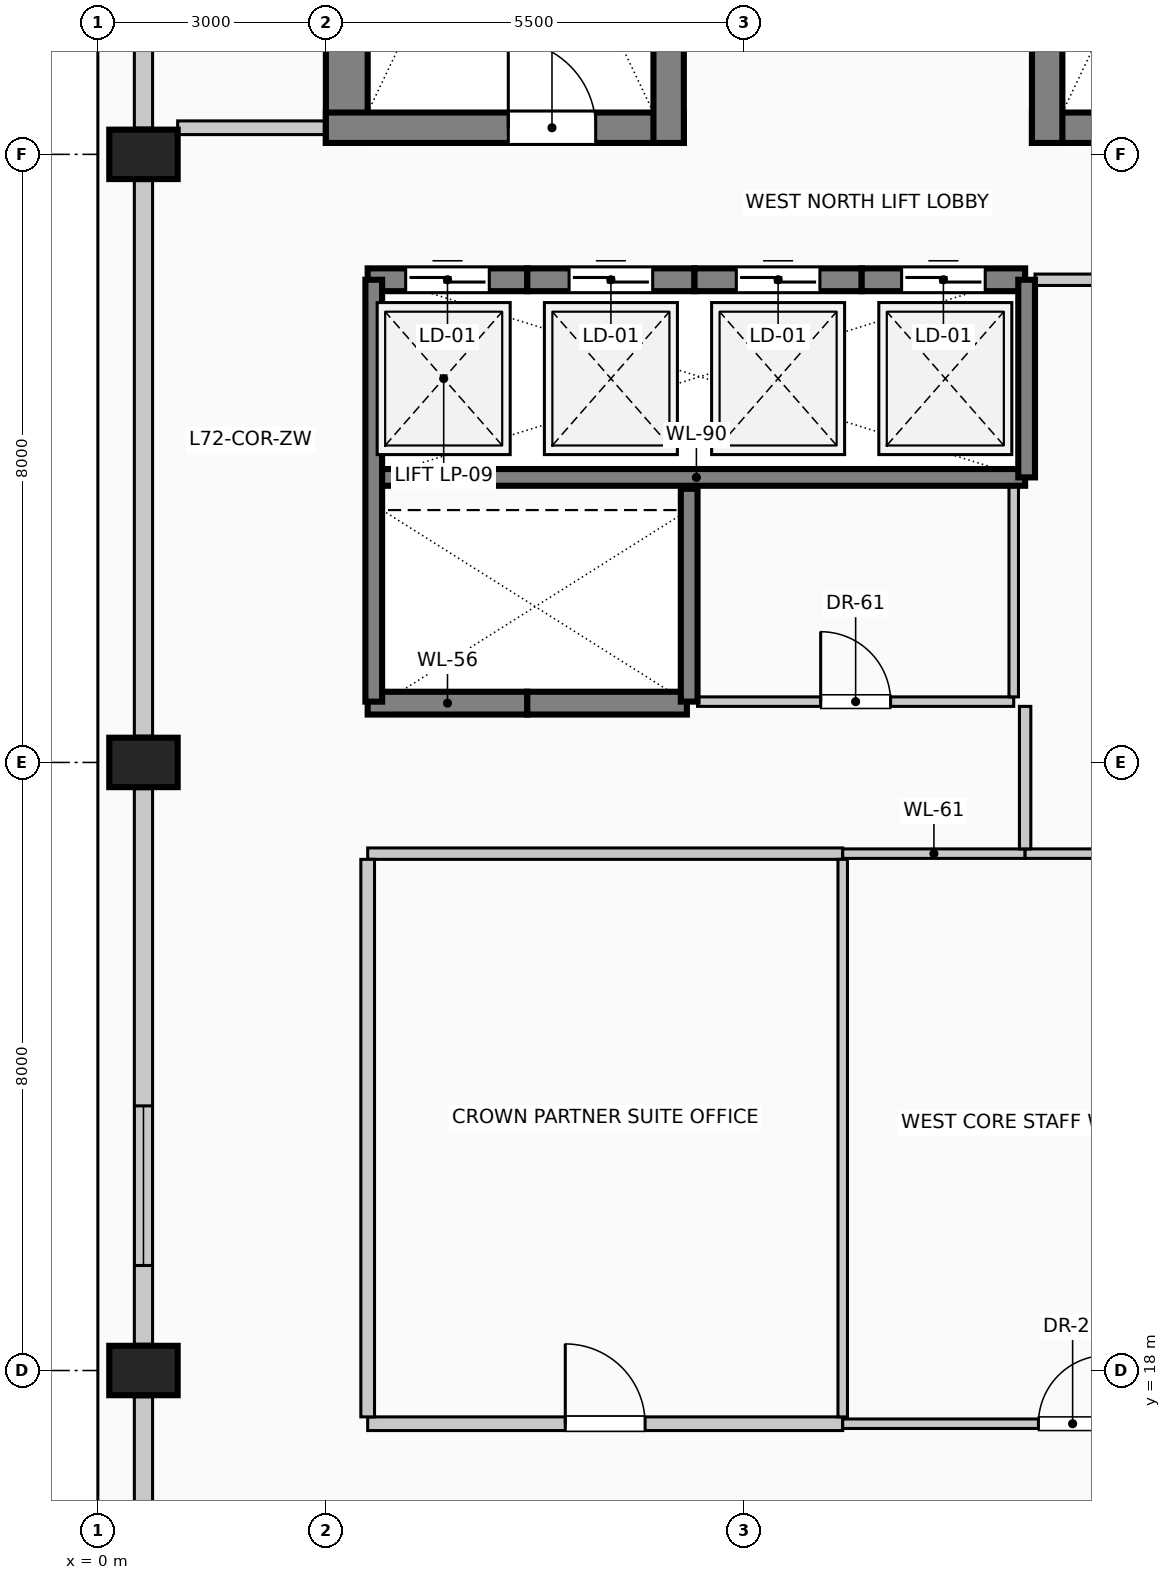
"""IFC4 building model, lengths in metres.
Left out: names, types, materials, properties, quantities, classifications, styles, units other than length and angle.
Written with IfcOpenShell. Run it as: python <this file> out.ifc"""

import sys

from ifc_helpers import new_model, si_unit, direction, frame, frame_2d, origin, origin_2d, place, context, subcontext, project, spatial, rectangle, extrude, element, fill, save


model = new_model("IFC4")
c1 = context("Model", 3, precision=1e-05, world=origin(), true_north=direction((0.0, 1.0)))
c2 = subcontext(c1, "Body", "Model", "MODEL_VIEW")
j1 = project(units=[si_unit("LENGTHUNIT", "METRE"), si_unit("PLANEANGLEUNIT", "RADIAN")], contexts=[c1])
p1 = place(None, origin())
s1 = spatial("IfcSite", under=j1, at=p1, CompositionType="ELEMENT")
p2 = place(p1, origin())
s2 = spatial("IfcBuilding", under=s1, at=p2, CompositionType="ELEMENT")
p3 = place(p2, frame((0.0, 0.0, 297.0)))
s3 = spatial("IfcBuildingStorey", under=s2, at=p3, CompositionType="ELEMENT", Elevation=297.0)
p4 = place(p3, frame((3.275, 34.15, 0.0), z_axis=(0.0, 0.0, 1.0), x_axis=(0.0, 1.0, 0.0)))
e1 = element("IfcWall", 1, at=p4, inside=s3, PredefinedType="SHEAR", context=c2, shape_type="SweptSolid", body=[
    extrude(rectangle(XDim=8.83, YDim=0.55, at=frame_2d((4.415, 0.0))), origin(), (0.0, 0.0, 1.0), 4.0),
])
p5 = place(p3, frame((3.0, 34.35, 0.0), z_axis=(0.0, 0.0, 1.0), x_axis=(1.0, 0.0, 0.0)))
e2 = element("IfcWall", 2, at=p5, inside=s3, PredefinedType="SHEAR", context=c2, shape_type="SweptSolid", body=[
    extrude(rectangle(XDim=4.71, YDim=0.4, at=frame_2d((2.355, 0.0))), origin(), (0.0, 0.0, 1.0), 4.0),
])
p6 = place(p5, frame((2.4, 0.0, 0.0)))
e3 = element("IfcOpeningElement", 3, at=p6, cuts=e2, PredefinedType="OPENING", context=c2, shape_type="SweptSolid", body=[
    extrude(rectangle(XDim=1.15, YDim=2.2, at=frame_2d((0.575, 1.1))), frame((0.0, 0.21, 0.0), z_axis=(0.0, -1.0, 0.0), x_axis=(1.0, 0.0, 0.0)), (0.0, 0.0, 1.0), 0.42),
])
p7 = place(p3, frame((12.29, 34.35, 0.0), z_axis=(0.0, 0.0, 1.0), x_axis=(1.0, 0.0, 0.0)))
e4 = element("IfcWall", 4, at=p7, inside=s3, PredefinedType="SHEAR", context=c2, shape_type="SweptSolid", body=[
    extrude(rectangle(XDim=4.71, YDim=0.4, at=frame_2d((2.355, 0.0))), origin(), (0.0, 0.0, 1.0), 4.0),
])
p8 = place(p7, frame((1.4, 0.0, 0.0)))
e5 = element("IfcOpeningElement", 5, at=p8, cuts=e4, PredefinedType="OPENING", context=c2, shape_type="SweptSolid", body=[
    extrude(rectangle(XDim=1.15, YDim=2.2, at=frame_2d((0.575, 1.1))), frame((0.0, 0.21, 0.0), z_axis=(0.0, -1.0, 0.0), x_axis=(1.0, 0.0, 0.0)), (0.0, 0.0, 1.0), 0.42),
])
for number, where, z_axis, x_axis in (
    (6, (7.51, 34.15, 0.0), (0.0, 0.0, 1.0), (0.0, 1.0, 0.0)),
    (7, (12.49, 34.15, 0.0), (0.0, 0.0, 1.0), (0.0, 1.0, 0.0)),
):
    element("IfcWall", number, at=place(p3, frame(where, z_axis=z_axis, x_axis=x_axis)), inside=s3, PredefinedType="SHEAR", context=c2, shape_type="SweptSolid", body=[
        extrude(rectangle(XDim=8.83, YDim=0.4, at=frame_2d((4.415, 0.0))), origin(), (0.0, 0.0, 1.0), 4.0),
    ])
for number, where, z_axis, x_axis in (
    (8, (0.6, 18.0, 0.0), (0.0, 0.0, 1.0), (0.0, 1.0, 0.0)),
    (9, (0.6, 26.0, 0.0), (0.0, 0.0, 1.0), (0.0, 1.0, 0.0)),
    (10, (0.6, 34.0, 0.0), (0.0, 0.0, 1.0), (0.0, 1.0, 0.0)),
):
    element("IfcColumn", number, at=place(p3, frame(where, z_axis=z_axis, x_axis=x_axis)), inside=s3, PredefinedType="COLUMN", context=c2, shape_type="SweptSolid", body=[
        extrude(rectangle(XDim=0.65, YDim=0.9, at=origin_2d()), origin(), (0.0, 0.0, 1.0), 4.0),
    ])
p9 = place(p3, frame((0.6, 10.345, 0.0), z_axis=(0.0, 0.0, 1.0), x_axis=(0.0, 1.0, 0.0)))
e11 = element("IfcWall", 11, at=p9, inside=s3, PredefinedType="SOLIDWALL", context=c2, shape_type="SweptSolid", body=[
    extrude(rectangle(XDim=7.31, YDim=0.24, at=frame_2d((3.655, 0.0))), origin(), (0.0, 0.0, 1.0), 3.025),
])
p10 = place(p9, frame((1.037, 0.0, 0.35)))
e12 = element("IfcOpeningElement", 12, at=p10, cuts=e11, PredefinedType="OPENING", context=c2, shape_type="SweptSolid", body=[
    extrude(rectangle(XDim=2.1, YDim=2.2, at=frame_2d((1.05, 1.1))), frame((0.0, 0.13, 0.0), z_axis=(0.0, -1.0, 0.0), x_axis=(1.0, 0.0, 0.0)), (0.0, 0.0, 1.0), 0.26),
])
p11 = place(p3, frame((0.6, 18.345, 0.0), z_axis=(0.0, 0.0, 1.0), x_axis=(0.0, 1.0, 0.0)))
e13 = element("IfcWall", 13, at=p11, inside=s3, PredefinedType="SOLIDWALL", context=c2, shape_type="SweptSolid", body=[
    extrude(rectangle(XDim=7.31, YDim=0.24, at=frame_2d((3.655, 0.0))), origin(), (0.0, 0.0, 1.0), 3.025),
])
p12 = place(p11, frame((1.037, 0.0, 0.35)))
e14 = element("IfcOpeningElement", 14, at=p12, cuts=e13, PredefinedType="OPENING", context=c2, shape_type="SweptSolid", body=[
    extrude(rectangle(XDim=2.1, YDim=2.2, at=frame_2d((1.05, 1.1))), frame((0.0, 0.13, 0.0), z_axis=(0.0, -1.0, 0.0), x_axis=(1.0, 0.0, 0.0)), (0.0, 0.0, 1.0), 0.26),
])
p13 = place(p3, frame((0.6, 26.345, 0.0), z_axis=(0.0, 0.0, 1.0), x_axis=(0.0, 1.0, 0.0)))
e15 = element("IfcWall", 15, at=p13, inside=s3, PredefinedType="SOLIDWALL", context=c2, shape_type="SweptSolid", body=[
    extrude(rectangle(XDim=7.31, YDim=0.24, at=frame_2d((3.655, 0.0))), origin(), (0.0, 0.0, 1.0), 3.025),
])
p14 = place(p3, frame((0.6, 34.345, 0.0), z_axis=(0.0, 0.0, 1.0), x_axis=(0.0, 1.0, 0.0)))
e16 = element("IfcWall", 16, at=p14, inside=s3, PredefinedType="SOLIDWALL", context=c2, shape_type="SweptSolid", body=[
    extrude(rectangle(XDim=7.71, YDim=0.24, at=frame_2d((3.855, 0.0))), origin(), (0.0, 0.0, 1.0), 3.025),
])
p15 = place(p3, frame((3.55, 32.35, 0.0), z_axis=(0.0, 0.0, 1.0), x_axis=(1.0, 0.0, 0.0)))
e17 = element("IfcWall", 17, at=p15, inside=s3, PredefinedType="SOLIDWALL", context=c2, shape_type="SweptSolid", body=[
    extrude(rectangle(XDim=2.1, YDim=0.3, at=frame_2d((1.05, 0.0))), origin(), (0.0, 0.0, 1.0), 4.0),
])
p16 = place(p15, frame((0.5, 0.0, 0.0)))
e18 = element("IfcOpeningElement", 18, at=p16, cuts=e17, PredefinedType="OPENING", context=c2, shape_type="SweptSolid", body=[
    extrude(rectangle(XDim=1.1, YDim=2.2, at=frame_2d((0.55, 1.1))), frame((0.0, 0.16, 0.0), z_axis=(0.0, -1.0, 0.0), x_axis=(1.0, 0.0, 0.0)), (0.0, 0.0, 1.0), 0.32),
])
p17 = place(p3, frame((5.65, 32.35, 0.0), z_axis=(0.0, 0.0, 1.0), x_axis=(1.0, 0.0, 0.0)))
e19 = element("IfcWall", 19, at=p17, inside=s3, PredefinedType="SOLIDWALL", context=c2, shape_type="SweptSolid", body=[
    extrude(rectangle(XDim=2.2, YDim=0.3, at=frame_2d((1.1, 0.0))), origin(), (0.0, 0.0, 1.0), 4.0),
])
p18 = place(p17, frame((0.55, 0.0, 0.0)))
e20 = element("IfcOpeningElement", 20, at=p18, cuts=e19, PredefinedType="OPENING", context=c2, shape_type="SweptSolid", body=[
    extrude(rectangle(XDim=1.1, YDim=2.2, at=frame_2d((0.55, 1.1))), frame((0.0, 0.16, 0.0), z_axis=(0.0, -1.0, 0.0), x_axis=(1.0, 0.0, 0.0)), (0.0, 0.0, 1.0), 0.32),
])
p19 = place(p3, frame((7.85, 32.35, 0.0), z_axis=(0.0, 0.0, 1.0), x_axis=(1.0, 0.0, 0.0)))
e21 = element("IfcWall", 21, at=p19, inside=s3, PredefinedType="SOLIDWALL", context=c2, shape_type="SweptSolid", body=[
    extrude(rectangle(XDim=2.2, YDim=0.3, at=frame_2d((1.1, 0.0))), origin(), (0.0, 0.0, 1.0), 4.0),
])
p20 = place(p19, frame((0.55, 0.0, 0.0)))
e22 = element("IfcOpeningElement", 22, at=p20, cuts=e21, PredefinedType="OPENING", context=c2, shape_type="SweptSolid", body=[
    extrude(rectangle(XDim=1.1, YDim=2.2, at=frame_2d((0.55, 1.1))), frame((0.0, 0.16, 0.0), z_axis=(0.0, -1.0, 0.0), x_axis=(1.0, 0.0, 0.0)), (0.0, 0.0, 1.0), 0.32),
])
p21 = place(p3, frame((10.05, 32.35, 0.0), z_axis=(0.0, 0.0, 1.0), x_axis=(1.0, 0.0, 0.0)))
e23 = element("IfcWall", 23, at=p21, inside=s3, PredefinedType="SOLIDWALL", context=c2, shape_type="SweptSolid", body=[
    extrude(rectangle(XDim=2.15, YDim=0.3, at=frame_2d((1.075, 0.0))), origin(), (0.0, 0.0, 1.0), 4.0),
])
p22 = place(p21, frame((0.525, 0.0, 0.0)))
e24 = element("IfcOpeningElement", 24, at=p22, cuts=e23, PredefinedType="OPENING", context=c2, shape_type="SweptSolid", body=[
    extrude(rectangle(XDim=1.1, YDim=2.2, at=frame_2d((0.55, 1.1))), frame((0.0, 0.16, 0.0), z_axis=(0.0, -1.0, 0.0), x_axis=(1.0, 0.0, 0.0)), (0.0, 0.0, 1.0), 0.32),
])
p23 = place(p3, frame((5.65, 26.78, 0.0), z_axis=(0.0, 0.0, 1.0), x_axis=(-1.0, 0.0, 0.0)))
e25 = element("IfcWall", 25, at=p23, inside=s3, PredefinedType="SOLIDWALL", context=c2, shape_type="SweptSolid", body=[
    extrude(rectangle(XDim=2.1, YDim=0.3, at=frame_2d((1.05, 0.0))), origin(), (0.0, 0.0, 1.0), 4.0),
])
p24 = place(p3, frame((7.75, 26.78, 0.0), z_axis=(0.0, 0.0, 1.0), x_axis=(-1.0, 0.0, 0.0)))
e26 = element("IfcWall", 26, at=p24, inside=s3, PredefinedType="SOLIDWALL", context=c2, shape_type="SweptSolid", body=[
    extrude(rectangle(XDim=2.1, YDim=0.3, at=frame_2d((1.05, 0.0))), origin(), (0.0, 0.0, 1.0), 4.0),
])
p25 = place(p3, frame((3.55, 29.75, 0.0), z_axis=(0.0, 0.0, 1.0), x_axis=(1.0, 0.0, 0.0)))
e27 = element("IfcWall", 27, at=p25, inside=s3, PredefinedType="SOLIDWALL", context=c2, shape_type="SweptSolid", body=[
    extrude(rectangle(XDim=8.65, YDim=0.22, at=frame_2d((4.325, 0.0))), origin(), (0.0, 0.0, 1.0), 4.0),
])
p26 = place(p3, frame((3.63, 26.8, 0.0), z_axis=(0.0, 0.0, 1.0), x_axis=(0.0, 1.0, 0.0)))
e28 = element("IfcWall", 28, at=p26, inside=s3, PredefinedType="SOLIDWALL", context=c2, shape_type="SweptSolid", body=[
    extrude(rectangle(XDim=5.55, YDim=0.22, at=frame_2d((2.775, 0.0))), origin(), (0.0, 0.0, 1.0), 4.0),
])
p27 = place(p3, frame((7.78, 26.8, 0.0), z_axis=(0.0, 0.0, 1.0), x_axis=(0.0, 1.0, 0.0)))
e29 = element("IfcWall", 29, at=p27, inside=s3, PredefinedType="SOLIDWALL", context=c2, shape_type="SweptSolid", body=[
    extrude(rectangle(XDim=2.8, YDim=0.22, at=frame_2d((1.4, 0.0))), origin(), (0.0, 0.0, 1.0), 4.0),
])
p28 = place(p3, frame((12.22, 29.75, 0.0), z_axis=(0.0, 0.0, 1.0), x_axis=(0.0, 1.0, 0.0)))
e30 = element("IfcWall", 30, at=p28, inside=s3, PredefinedType="SOLIDWALL", context=c2, shape_type="SweptSolid", body=[
    extrude(rectangle(XDim=2.6, YDim=0.22, at=frame_2d((1.3, 0.0))), origin(), (0.0, 0.0, 1.0), 4.0),
])
p29 = place(p3, frame((3.55, 17.3, 0.0), z_axis=(0.0, 0.0, 1.0), x_axis=(1.0, 0.0, 0.0)))
e31 = element("IfcWall", 31, at=p29, inside=s3, PredefinedType="PARTITIONING", context=c2, shape_type="SweptSolid", body=[
    extrude(rectangle(XDim=6.25, YDim=0.18, at=frame_2d((3.125, 0.0))), origin(), (0.0, 0.0, 1.0), 3.775),
])
p30 = place(p29, frame((2.6, 0.0, 0.0)))
e32 = element("IfcOpeningElement", 32, at=p30, cuts=e31, PredefinedType="OPENING", context=c2, shape_type="SweptSolid", body=[
    extrude(rectangle(XDim=1.05, YDim=2.15, at=frame_2d((0.525, 1.075))), frame((0.0, 0.1, 0.0), z_axis=(0.0, -1.0, 0.0), x_axis=(1.0, 0.0, 0.0)), (0.0, 0.0, 1.0), 0.2),
])
p31 = place(p3, frame((9.8, 17.3, 0.0), z_axis=(0.0, 0.0, 1.0), x_axis=(1.0, 0.0, 0.0)))
e33 = element("IfcWall", 33, at=p31, inside=s3, PredefinedType="PARTITIONING", context=c2, shape_type="SweptSolid", body=[
    extrude(rectangle(XDim=6.05, YDim=0.125, at=frame_2d((3.025, 0.0))), origin(), (0.0, 0.0, 1.0), 3.775),
])
p32 = place(p31, frame((2.575, 0.0, 0.0)))
e34 = element("IfcOpeningElement", 34, at=p32, cuts=e33, PredefinedType="OPENING", context=c2, shape_type="SweptSolid", body=[
    extrude(rectangle(XDim=0.9, YDim=2.1, at=frame_2d((0.45, 1.05))), frame((0.0, 0.073, 0.0), z_axis=(0.0, -1.0, 0.0), x_axis=(1.0, 0.0, 0.0)), (0.0, 0.0, 1.0), 0.145),
])
p33 = place(p3, frame((3.55, 24.8, 0.0), z_axis=(0.0, 0.0, 1.0), x_axis=(1.0, 0.0, 0.0)))
e35 = element("IfcWall", 35, at=p33, inside=s3, PredefinedType="PARTITIONING", context=c2, shape_type="SweptSolid", body=[
    extrude(rectangle(XDim=6.25, YDim=0.15, at=frame_2d((3.125, 0.0))), origin(), (0.0, 0.0, 1.0), 3.775),
])
p34 = place(p3, frame((9.8, 24.8, 0.0), z_axis=(0.0, 0.0, 1.0), x_axis=(1.0, 0.0, 0.0)))
e36 = element("IfcWall", 36, at=p34, inside=s3, PredefinedType="PARTITIONING", context=c2, shape_type="SweptSolid", body=[
    extrude(rectangle(XDim=2.4, YDim=0.125, at=frame_2d((1.2, 0.0))), origin(), (0.0, 0.0, 1.0), 3.775),
])
p35 = place(p3, frame((12.2, 24.8, 0.0), z_axis=(0.0, 0.0, 1.0), x_axis=(1.0, 0.0, 0.0)))
e37 = element("IfcWall", 37, at=p35, inside=s3, PredefinedType="PARTITIONING", context=c2, shape_type="SweptSolid", body=[
    extrude(rectangle(XDim=3.65, YDim=0.125, at=frame_2d((1.825, 0.0))), origin(), (0.0, 0.0, 1.0), 3.775),
])
p36 = place(p3, frame((7.89, 26.8, 0.0), z_axis=(0.0, 0.0, 1.0), x_axis=(1.0, 0.0, 0.0)))
e38 = element("IfcWall", 38, at=p36, inside=s3, PredefinedType="PARTITIONING", context=c2, shape_type="SweptSolid", body=[
    extrude(rectangle(XDim=4.16, YDim=0.125, at=frame_2d((2.08, 0.0))), origin(), (0.0, 0.0, 1.0), 3.775),
])
p37 = place(p36, frame((1.62, 0.0, 0.0)))
e39 = element("IfcOpeningElement", 39, at=p37, cuts=e38, PredefinedType="OPENING", context=c2, shape_type="SweptSolid", body=[
    extrude(rectangle(XDim=0.92, YDim=2.1, at=frame_2d((0.46, 1.05))), frame((0.0, 0.073, 0.0), z_axis=(0.0, -1.0, 0.0), x_axis=(1.0, 0.0, 0.0)), (0.0, 0.0, 1.0), 0.145),
])
p38 = place(p3, frame((12.33, 32.35, 0.0), z_axis=(0.0, 0.0, 1.0), x_axis=(1.0, 0.0, 0.0)))
e40 = element("IfcWall", 40, at=p38, inside=s3, PredefinedType="PARTITIONING", context=c2, shape_type="SweptSolid", body=[
    extrude(rectangle(XDim=3.52, YDim=0.15, at=frame_2d((1.76, 0.0))), origin(), (0.0, 0.0, 1.0), 3.775),
])
p39 = place(p38, frame((1.235, 0.0, 0.0)))
e41 = element("IfcOpeningElement", 41, at=p39, cuts=e40, PredefinedType="OPENING", context=c2, shape_type="SweptSolid", body=[
    extrude(rectangle(XDim=1.05, YDim=2.15, at=frame_2d((0.525, 1.075))), frame((0.0, 0.085, 0.0), z_axis=(0.0, -1.0, 0.0), x_axis=(1.0, 0.0, 0.0)), (0.0, 0.0, 1.0), 0.17),
])
p40 = place(p3, frame((1.05, 34.35, 0.0), z_axis=(0.0, 0.0, 1.0), x_axis=(1.0, 0.0, 0.0)))
e42 = element("IfcWall", 42, at=p40, inside=s3, PredefinedType="PARTITIONING", context=c2, shape_type="SweptSolid", body=[
    extrude(rectangle(XDim=1.95, YDim=0.18, at=frame_2d((0.975, 0.0))), origin(), (0.0, 0.0, 1.0), 3.775),
])
p41 = place(p3, frame((3.55, 17.39, 0.0), z_axis=(0.0, 0.0, 1.0), x_axis=(0.0, 1.0, 0.0)))
e43 = element("IfcWall", 43, at=p41, inside=s3, PredefinedType="PARTITIONING", context=c2, shape_type="SweptSolid", body=[
    extrude(rectangle(XDim=7.335, YDim=0.18, at=frame_2d((3.667, 0.0))), origin(), (0.0, 0.0, 1.0), 3.775),
])
p42 = place(p3, frame((9.8, 17.39, 0.0), z_axis=(0.0, 0.0, 1.0), x_axis=(0.0, 1.0, 0.0)))
e44 = element("IfcWall", 44, at=p42, inside=s3, PredefinedType="PARTITIONING", context=c2, shape_type="SweptSolid", body=[
    extrude(rectangle(XDim=7.335, YDim=0.125, at=frame_2d((3.667, 0.0))), origin(), (0.0, 0.0, 1.0), 3.775),
])
p43 = place(p3, frame((12.05, 26.863, 0.0), z_axis=(0.0, 0.0, 1.0), x_axis=(0.0, 1.0, 0.0)))
e45 = element("IfcWall", 45, at=p43, inside=s3, PredefinedType="PARTITIONING", context=c2, shape_type="SweptSolid", body=[
    extrude(rectangle(XDim=2.777, YDim=0.125, at=frame_2d((1.389, 0.0))), origin(), (0.0, 0.0, 1.0), 3.775),
])
p44 = place(p3, frame((12.2, 24.863, 0.0), z_axis=(0.0, 0.0, 1.0), x_axis=(0.0, 1.0, 0.0)))
e46 = element("IfcWall", 46, at=p44, inside=s3, PredefinedType="PARTITIONING", context=c2, shape_type="SweptSolid", body=[
    extrude(rectangle(XDim=1.875, YDim=0.15, at=frame_2d((0.938, 0.0))), origin(), (0.0, 0.0, 1.0), 3.775),
])
p45 = place(p12, origin())
e47 = element("IfcWindow", 47, at=p45, inside=s3, PartitioningType="SINGLE_PANEL", PredefinedType="WINDOW", context=c2, shape_type="SweptSolid", body=[
    extrude(rectangle(XDim=2.1, YDim=2.2, at=frame_2d((1.05, 1.1))), frame((0.0, 0.03, 0.0), z_axis=(0.0, -1.0, 0.0), x_axis=(1.0, 0.0, 0.0)), (0.0, 0.0, 1.0), 0.06),
])
fill(e14, e47)
p46 = place(p16, origin())
e48 = element("IfcDoor", 48, at=p46, inside=s3, OperationType="SLIDING_TO_LEFT", PredefinedType="DOOR", context=c2, shape_type="SweptSolid", body=[
    extrude(rectangle(XDim=1.1, YDim=2.2, at=frame_2d((0.55, 1.1))), frame((0.0, 0.025, 0.0), z_axis=(0.0, -1.0, 0.0), x_axis=(1.0, 0.0, 0.0)), (0.0, 0.0, 1.0), 0.05),
])
fill(e18, e48)
p47 = place(p18, origin())
e49 = element("IfcDoor", 49, at=p47, inside=s3, OperationType="SLIDING_TO_RIGHT", PredefinedType="DOOR", context=c2, shape_type="SweptSolid", body=[
    extrude(rectangle(XDim=1.1, YDim=2.2, at=frame_2d((0.55, 1.1))), frame((0.0, 0.025, 0.0), z_axis=(0.0, -1.0, 0.0), x_axis=(1.0, 0.0, 0.0)), (0.0, 0.0, 1.0), 0.05),
])
fill(e20, e49)
p48 = place(p20, origin())
e50 = element("IfcDoor", 50, at=p48, inside=s3, OperationType="SLIDING_TO_LEFT", PredefinedType="DOOR", context=c2, shape_type="SweptSolid", body=[
    extrude(rectangle(XDim=1.1, YDim=2.2, at=frame_2d((0.55, 1.1))), frame((0.0, 0.025, 0.0), z_axis=(0.0, -1.0, 0.0), x_axis=(1.0, 0.0, 0.0)), (0.0, 0.0, 1.0), 0.05),
])
fill(e22, e50)
p49 = place(p22, origin())
e51 = element("IfcDoor", 51, at=p49, inside=s3, OperationType="SLIDING_TO_RIGHT", PredefinedType="DOOR", context=c2, shape_type="SweptSolid", body=[
    extrude(rectangle(XDim=1.1, YDim=2.2, at=frame_2d((0.55, 1.1))), frame((0.0, 0.025, 0.0), z_axis=(0.0, -1.0, 0.0), x_axis=(1.0, 0.0, 0.0)), (0.0, 0.0, 1.0), 0.05),
])
fill(e24, e51)
p50 = place(p6, origin())
e52 = element("IfcDoor", 52, at=p50, inside=s3, OperationType="SINGLE_SWING_LEFT", PredefinedType="DOOR", context=c2, shape_type="SweptSolid", body=[
    extrude(rectangle(XDim=1.15, YDim=2.2, at=frame_2d((0.575, 1.1))), frame((0.0, 0.025, 0.0), z_axis=(0.0, -1.0, 0.0), x_axis=(1.0, 0.0, 0.0)), (0.0, 0.0, 1.0), 0.05),
])
fill(e3, e52)
p51 = place(p30, origin())
e53 = element("IfcDoor", 53, at=p51, inside=s3, OperationType="SINGLE_SWING_LEFT", PredefinedType="DOOR", context=c2, shape_type="SweptSolid", body=[
    extrude(rectangle(XDim=1.05, YDim=2.15, at=frame_2d((0.525, 1.075))), frame((0.0, 0.025, 0.0), z_axis=(0.0, -1.0, 0.0), x_axis=(1.0, 0.0, 0.0)), (0.0, 0.0, 1.0), 0.05),
])
fill(e32, e53)
p52 = place(p32, origin())
e54 = element("IfcDoor", 54, at=p52, inside=s3, OperationType="SINGLE_SWING_RIGHT", PredefinedType="DOOR", context=c2, shape_type="SweptSolid", body=[
    extrude(rectangle(XDim=0.9, YDim=2.1, at=frame_2d((0.45, 1.05))), frame((0.0, 0.025, 0.0), z_axis=(0.0, -1.0, 0.0), x_axis=(1.0, 0.0, 0.0)), (0.0, 0.0, 1.0), 0.05),
])
fill(e34, e54)
p53 = place(p37, origin())
e55 = element("IfcDoor", 55, at=p53, inside=s3, OperationType="SINGLE_SWING_LEFT", PredefinedType="DOOR", context=c2, shape_type="SweptSolid", body=[
    extrude(rectangle(XDim=0.92, YDim=2.1, at=frame_2d((0.46, 1.05))), frame((0.0, 0.025, 0.0), z_axis=(0.0, -1.0, 0.0), x_axis=(1.0, 0.0, 0.0)), (0.0, 0.0, 1.0), 0.05),
])
fill(e39, e55)
save(model, sys.argv[1])
